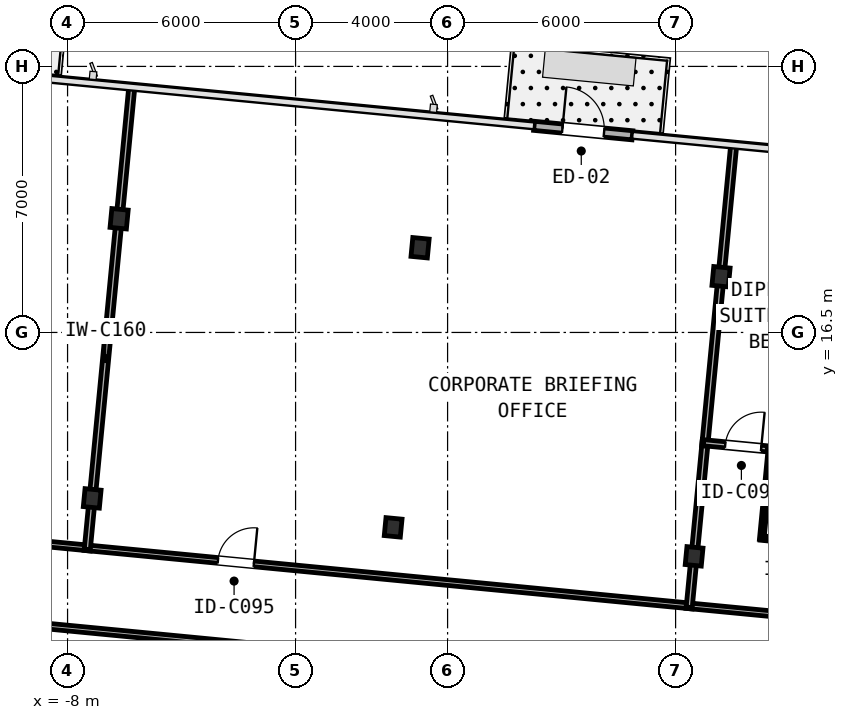
"""IFC4 building model, lengths in metres.
Left out: names, types, materials, properties, quantities, classifications, styles, units other than length and angle.
Written with IfcOpenShell. Run it as: python <this file> out.ifc"""

import sys

from ifc_helpers import new_model, si_unit, direction, frame, frame_2d, origin, origin_2d, place, context, subcontext, project, spatial, rectangle, i_section, extrude, element, fill, save


model = new_model("IFC4")
c1 = context("Model", 3, precision=1e-05, world=origin(), true_north=direction((0.0, 1.0)))
c2 = subcontext(c1, "Body", "Model", "MODEL_VIEW")
j1 = project(units=[si_unit("LENGTHUNIT", "METRE"), si_unit("PLANEANGLEUNIT", "RADIAN")], contexts=[c1])
p1 = place(None, origin())
s1 = spatial("IfcSite", under=j1, at=p1, CompositionType="ELEMENT")
p2 = place(p1, origin())
s2 = spatial("IfcBuilding", under=s1, at=p2, CompositionType="ELEMENT")
p3 = place(p2, frame((0.0, 0.0, 163.5)))
s3 = spatial("IfcBuildingStorey", under=s2, at=p3, CompositionType="ELEMENT", Elevation=163.5)
p4 = place(p3, frame((-7.352, 12.134, 0.0), z_axis=(0.0, 0.0, 1.0), x_axis=(0.995396198367, -0.09584575252, 0.0)))
e1 = element("IfcColumn", 1, at=p4, inside=s3, PredefinedType="COLUMN", context=c2, shape_type="SweptSolid", body=[
    extrude(i_section(OverallWidth=0.424, OverallDepth=0.474, WebThickness=0.048, FlangeThickness=0.077, FilletRadius=0.031, at=origin_2d()), origin(), (0.0, 0.0, 1.0), 3.45),
])
p5 = place(p3, frame((-6.643, 19.492, 0.0), z_axis=(0.0, 0.0, 1.0), x_axis=(0.995396198367, -0.09584575252, 0.0)))
e2 = element("IfcColumn", 2, at=p5, inside=s3, PredefinedType="COLUMN", context=c2, shape_type="SweptSolid", body=[
    extrude(i_section(OverallWidth=0.432, OverallDepth=0.498, WebThickness=0.056, FlangeThickness=0.089, FilletRadius=0.031, at=origin_2d()), origin(), (0.0, 0.0, 1.0), 3.45),
])
p6 = place(p3, frame((0.568, 11.371, 0.0), z_axis=(0.0, 0.0, 1.0), x_axis=(0.995396198367, -0.09584575252, 0.0)))
e3 = element("IfcColumn", 3, at=p6, inside=s3, PredefinedType="COLUMN", context=c2, shape_type="SweptSolid", body=[
    extrude(i_section(OverallWidth=0.424, OverallDepth=0.474, WebThickness=0.048, FlangeThickness=0.077, FilletRadius=0.031, at=origin_2d()), origin(), (0.0, 0.0, 1.0), 3.45),
])
p7 = place(p3, frame((1.276, 18.729, 0.0), z_axis=(0.0, 0.0, 1.0), x_axis=(0.995396198367, -0.09584575252, 0.0)))
e4 = element("IfcColumn", 4, at=p7, inside=s3, PredefinedType="COLUMN", context=c2, shape_type="SweptSolid", body=[
    extrude(i_section(OverallWidth=0.432, OverallDepth=0.498, WebThickness=0.056, FlangeThickness=0.089, FilletRadius=0.031, at=origin_2d()), origin(), (0.0, 0.0, 1.0), 3.45),
])
p8 = place(p3, frame((8.487, 10.609, 0.0), z_axis=(0.0, 0.0, 1.0), x_axis=(0.995396198367, -0.09584575252, 0.0)))
e5 = element("IfcColumn", 5, at=p8, inside=s3, PredefinedType="COLUMN", context=c2, shape_type="SweptSolid", body=[
    extrude(i_section(OverallWidth=0.424, OverallDepth=0.474, WebThickness=0.048, FlangeThickness=0.077, FilletRadius=0.031, at=origin_2d()), origin(), (0.0, 0.0, 1.0), 3.45),
])
p9 = place(p3, frame((9.195, 17.967, 0.0), z_axis=(0.0, 0.0, 1.0), x_axis=(0.995396198367, -0.09584575252, 0.0)))
e6 = element("IfcColumn", 6, at=p9, inside=s3, PredefinedType="COLUMN", context=c2, shape_type="SweptSolid", body=[
    extrude(i_section(OverallWidth=0.432, OverallDepth=0.498, WebThickness=0.056, FlangeThickness=0.089, FilletRadius=0.031, at=origin_2d()), origin(), (0.0, 0.0, 1.0), 3.45),
])
p10 = place(p3, frame((4.275, 21.937, 0.0), z_axis=(0.0, 0.0, 1.0), x_axis=(0.995394049959, -0.095868061976, 0.0)))
e7 = element("IfcWall", 7, at=p10, inside=s3, PredefinedType="STANDARD", context=c2, shape_type="SweptSolid", body=[
    extrude(rectangle(XDim=2.6, YDim=0.24, at=frame_2d((1.3, 0.0))), origin(), (0.0, 0.0, 1.0), 3.19),
])
p11 = place(p10, frame((0.75, 0.0, 0.0)))
e8 = element("IfcOpeningElement", 8, at=p11, cuts=e7, PredefinedType="OPENING", context=c2, shape_type="SweptSolid", body=[
    extrude(rectangle(XDim=1.1, YDim=2.15, at=frame_2d((0.55, 1.075))), frame((0.0, 0.13, 0.0), z_axis=(0.0, -1.0, 0.0), x_axis=(1.0, 0.0, 0.0)), (0.0, 0.0, 1.0), 0.26),
])
p12 = place(p3, frame((-19.02, 11.943, 0.0), z_axis=(0.0, 0.0, 1.0), x_axis=(0.995395421372, -0.095853821582, 0.0)))
e9 = element("IfcWall", 9, at=p12, inside=s3, PredefinedType="PARTITIONING", context=c2, shape_type="SweptSolid", body=[
    extrude(rectangle(XDim=11.678, YDim=0.15, at=frame_2d((5.839, 0.0))), origin(), (0.0, 0.0, 1.0), 2.479),
])
p13 = place(p12, frame((7.312, 0.0, 0.0)))
e10 = element("IfcOpeningElement", 10, at=p13, cuts=e9, PredefinedType="OPENING", context=c2, shape_type="SweptSolid", body=[
    extrude(rectangle(XDim=0.95, YDim=2.15, at=frame_2d((0.475, 1.075))), frame((0.0, 0.085, 0.0), z_axis=(0.0, -1.0, 0.0), x_axis=(1.0, 0.0, 0.0)), (0.0, 0.0, 1.0), 0.17),
])
p14 = place(p3, frame((-7.559, 10.84, 0.0), z_axis=(0.0, 0.0, 1.0), x_axis=(0.995396443768, -0.095843203903, 0.0)))
e11 = element("IfcWall", 11, at=p14, inside=s3, PredefinedType="PARTITIONING", context=c2, shape_type="SweptSolid", body=[
    extrude(rectangle(XDim=16.076, YDim=0.15, at=frame_2d((8.038, 0.0))), origin(), (0.0, 0.0, 1.0), 2.479),
])
p15 = place(p14, frame((3.532, 0.0, 0.0)))
e12 = element("IfcOpeningElement", 12, at=p15, cuts=e11, PredefinedType="OPENING", context=c2, shape_type="SweptSolid", body=[
    extrude(rectangle(XDim=0.95, YDim=2.15, at=frame_2d((0.475, 1.075))), frame((0.0, 0.085, 0.0), z_axis=(0.0, -1.0, 0.0), x_axis=(1.0, 0.0, 0.0)), (0.0, 0.0, 1.0), 0.17),
])
p16 = place(p3, frame((8.28, 9.314, 0.0), z_axis=(0.0, 0.0, 1.0), x_axis=(0.995395467524, -0.095853342309, 0.0)))
e13 = element("IfcWall", 13, at=p16, inside=s3, PredefinedType="PARTITIONING", context=c2, shape_type="SweptSolid", body=[
    extrude(rectangle(XDim=8.12, YDim=0.15, at=frame_2d((4.06, 0.0))), origin(), (0.0, 0.0, 1.0), 2.479),
])
p17 = place(p16, frame((3.585, 0.0, 0.0)))
e14 = element("IfcOpeningElement", 14, at=p17, cuts=e13, PredefinedType="OPENING", context=c2, shape_type="SweptSolid", body=[
    extrude(rectangle(XDim=0.95, YDim=2.15, at=frame_2d((0.475, 1.075))), frame((0.0, 0.085, 0.0), z_axis=(0.0, -1.0, 0.0), x_axis=(1.0, 0.0, 0.0)), (0.0, 0.0, 1.0), 0.17),
])
p18 = place(p3, frame((3.121, 7.651, 0.0), z_axis=(0.0, 0.0, 1.0), x_axis=(-0.995397135603, 0.095836018457, 0.0)))
e15 = element("IfcWall", 15, at=p18, inside=s3, PredefinedType="PARTITIONING", context=c2, shape_type="SweptSolid", body=[
    extrude(rectangle(XDim=18.892, YDim=0.15, at=frame_2d((9.446, 0.0))), origin(), (0.0, 0.0, 1.0), 2.479),
])
p19 = place(p18, frame((14.502, 0.0, 0.0)))
e16 = element("IfcOpeningElement", 16, at=p19, cuts=e15, PredefinedType="OPENING", context=c2, shape_type="SweptSolid", body=[
    extrude(rectangle(XDim=0.95, YDim=2.15, at=frame_2d((0.475, 1.075))), frame((0.0, 0.085, 0.0), z_axis=(0.0, -1.0, 0.0), x_axis=(1.0, 0.0, 0.0)), (0.0, 0.0, 1.0), 0.17),
])
p20 = place(p3, frame((-7.369, 11.958, 0.0), z_axis=(0.0, 0.0, 1.0), x_axis=(-0.095831494917, -0.995397571115, 0.0)))
e17 = element("IfcWall", 17, at=p20, inside=s3, PredefinedType="PARTITIONING", context=c2, shape_type="SweptSolid", body=[
    extrude(rectangle(XDim=1.172, YDim=0.16, at=frame_2d((0.586, 0.0))), origin(), (0.0, 0.0, 1.0), 2.479),
])
p21 = place(p3, frame((-6.66, 19.316, 0.0), z_axis=(0.0, 0.0, 1.0), x_axis=(-0.095853155488, -0.995395485515, 0.0)))
e18 = element("IfcWall", 18, at=p21, inside=s3, PredefinedType="PARTITIONING", context=c2, shape_type="SweptSolid", body=[
    extrude(rectangle(XDim=7.04, YDim=0.16, at=frame_2d((3.52, 0.0))), origin(), (0.0, 0.0, 1.0), 2.479),
])
p22 = place(p3, frame((-6.306, 22.995, 0.0), z_axis=(0.0, 0.0, 1.0), x_axis=(-0.095859866796, -0.995394839216, 0.0)))
e19 = element("IfcWall", 19, at=p22, inside=s3, PredefinedType="PARTITIONING", context=c2, shape_type="SweptSolid", body=[
    extrude(rectangle(XDim=3.344, YDim=0.16, at=frame_2d((1.672, 0.0))), origin(), (0.0, 0.0, 1.0), 3.19),
])
p23 = place(p3, frame((8.47, 10.433, 0.0), z_axis=(0.0, 0.0, 1.0), x_axis=(-0.095831494917, -0.995397571115, 0.0)))
e20 = element("IfcWall", 20, at=p23, inside=s3, PredefinedType="PARTITIONING", context=c2, shape_type="SweptSolid", body=[
    extrude(rectangle(XDim=1.172, YDim=0.16, at=frame_2d((0.586, 0.0))), origin(), (0.0, 0.0, 1.0), 2.479),
])
p24 = place(p3, frame((8.782, 13.677, 0.0), z_axis=(0.0, 0.0, 1.0), x_axis=(-0.095851667856, -0.995395628767, 0.0)))
e21 = element("IfcWall", 21, at=p24, inside=s3, PredefinedType="PARTITIONING", context=c2, shape_type="SweptSolid", body=[
    extrude(rectangle(XDim=2.906, YDim=0.16, at=frame_2d((1.453, 0.0))), origin(), (0.0, 0.0, 1.0), 2.479),
])
p25 = place(p3, frame((9.178, 17.791, 0.0), z_axis=(0.0, 0.0, 1.0), x_axis=(-0.095830387623, -0.995397677719, 0.0)))
e22 = element("IfcWall", 22, at=p25, inside=s3, PredefinedType="PARTITIONING", context=c2, shape_type="SweptSolid", body=[
    extrude(rectangle(XDim=4.298, YDim=0.16, at=frame_2d((2.149, 0.0))), origin(), (0.0, 0.0, 1.0), 2.479),
])
p26 = place(p3, frame((9.533, 21.47, 0.0), z_axis=(0.0, 0.0, 1.0), x_axis=(-0.095859866796, -0.995394839216, 0.0)))
e23 = element("IfcWall", 23, at=p26, inside=s3, PredefinedType="PARTITIONING", context=c2, shape_type="SweptSolid", body=[
    extrude(rectangle(XDim=3.344, YDim=0.16, at=frame_2d((1.672, 0.0))), origin(), (0.0, 0.0, 1.0), 3.19),
])
p27 = place(p3, frame((8.735, 13.599, 0.0), z_axis=(0.0, 0.0, 1.0), x_axis=(0.995394173932, -0.095866774755, 0.0)))
e24 = element("IfcWall", 24, at=p27, inside=s3, PredefinedType="PARTITIONING", context=c2, shape_type="SweptSolid", body=[
    extrude(rectangle(XDim=1.808, YDim=0.16, at=frame_2d((0.904, 0.0))), origin(), (0.0, 0.0, 1.0), 2.479),
])
p28 = place(p27, frame((0.574, 0.0, 0.0)))
e25 = element("IfcOpeningElement", 25, at=p28, cuts=e24, PredefinedType="OPENING", context=c2, shape_type="SweptSolid", body=[
    extrude(rectangle(XDim=0.95, YDim=2.15, at=frame_2d((0.475, 1.075))), frame((0.0, 0.09, 0.0), z_axis=(0.0, -1.0, 0.0), x_axis=(1.0, 0.0, 0.0)), (0.0, 0.0, 1.0), 0.18),
])
p29 = place(p3, frame((10.498, 13.469, 0.0), z_axis=(0.0, 0.0, 1.0), x_axis=(-0.095842578202, -0.995396504014, 0.0)))
e26 = element("IfcWall", 26, at=p29, inside=s3, PredefinedType="PARTITIONING", context=c2, shape_type="SweptSolid", body=[
    extrude(rectangle(XDim=2.43, YDim=0.12, at=frame_2d((1.215, 0.0))), origin(), (0.0, 0.0, 1.0), 3.19),
])
p30 = place(p3, frame((10.229, 11.094, 0.0), z_axis=(0.0, 0.0, 1.0), x_axis=(0.995403652262, -0.095768309281, 0.0)))
e27 = element("IfcWall", 27, at=p30, inside=s3, PredefinedType="PARTITIONING", context=c2, shape_type="SweptSolid", body=[
    extrude(rectangle(XDim=2.33, YDim=0.12, at=frame_2d((1.165, 0.0))), origin(), (0.0, 0.0, 1.0), 2.718),
])
p31 = place(p3, frame((12.774, 13.21, 0.0), z_axis=(0.0, 0.0, 1.0), x_axis=(-0.995398273854, 0.095824195322, 0.0)))
e28 = element("IfcWall", 28, at=p31, inside=s3, PredefinedType="PARTITIONING", context=c2, shape_type="SweptSolid", body=[
    extrude(rectangle(XDim=2.372, YDim=0.12, at=frame_2d((1.186, 0.0))), origin(), (0.0, 0.0, 1.0), 2.718),
])
p32 = place(p31, frame((0.28, 0.0, 0.0)))
e29 = element("IfcOpeningElement", 29, at=p32, cuts=e28, PredefinedType="OPENING", context=c2, shape_type="SweptSolid", body=[
    extrude(rectangle(XDim=0.85, YDim=2.1, at=frame_2d((0.425, 1.05))), frame((0.0, 0.07, 0.0), z_axis=(0.0, -1.0, 0.0), x_axis=(1.0, 0.0, 0.0)), (0.0, 0.0, 1.0), 0.14),
])
p33 = place(p11, origin())
e30 = element("IfcDoor", 30, at=p33, inside=s3, OperationType="SINGLE_SWING_LEFT", PredefinedType="DOOR", context=c2, shape_type="SweptSolid", body=[
    extrude(rectangle(XDim=1.1, YDim=2.15, at=frame_2d((0.55, 1.075))), frame((0.0, 0.025, 0.0), z_axis=(0.0, -1.0, 0.0), x_axis=(1.0, 0.0, 0.0)), (0.0, 0.0, 1.0), 0.05),
])
fill(e8, e30)
p34 = place(p15, frame((0.95, 0.0, 0.0), z_axis=(0.0, 0.0, 1.0), x_axis=(-1.0, 0.0, 0.0)))
e31 = element("IfcDoor", 31, at=p34, inside=s3, OperationType="SINGLE_SWING_RIGHT", PredefinedType="DOOR", context=c2, shape_type="SweptSolid", body=[
    extrude(rectangle(XDim=0.95, YDim=2.15, at=frame_2d((0.475, 1.075))), frame((0.0, 0.025, 0.0), z_axis=(0.0, -1.0, 0.0), x_axis=(1.0, 0.0, 0.0)), (0.0, 0.0, 1.0), 0.05),
])
fill(e12, e31)
p35 = place(p28, origin())
e32 = element("IfcDoor", 32, at=p35, inside=s3, OperationType="SINGLE_SWING_RIGHT", PredefinedType="DOOR", context=c2, shape_type="SweptSolid", body=[
    extrude(rectangle(XDim=0.95, YDim=2.15, at=frame_2d((0.475, 1.075))), frame((0.0, 0.025, 0.0), z_axis=(0.0, -1.0, 0.0), x_axis=(1.0, 0.0, 0.0)), (0.0, 0.0, 1.0), 0.05),
])
fill(e25, e32)
save(model, sys.argv[1])
